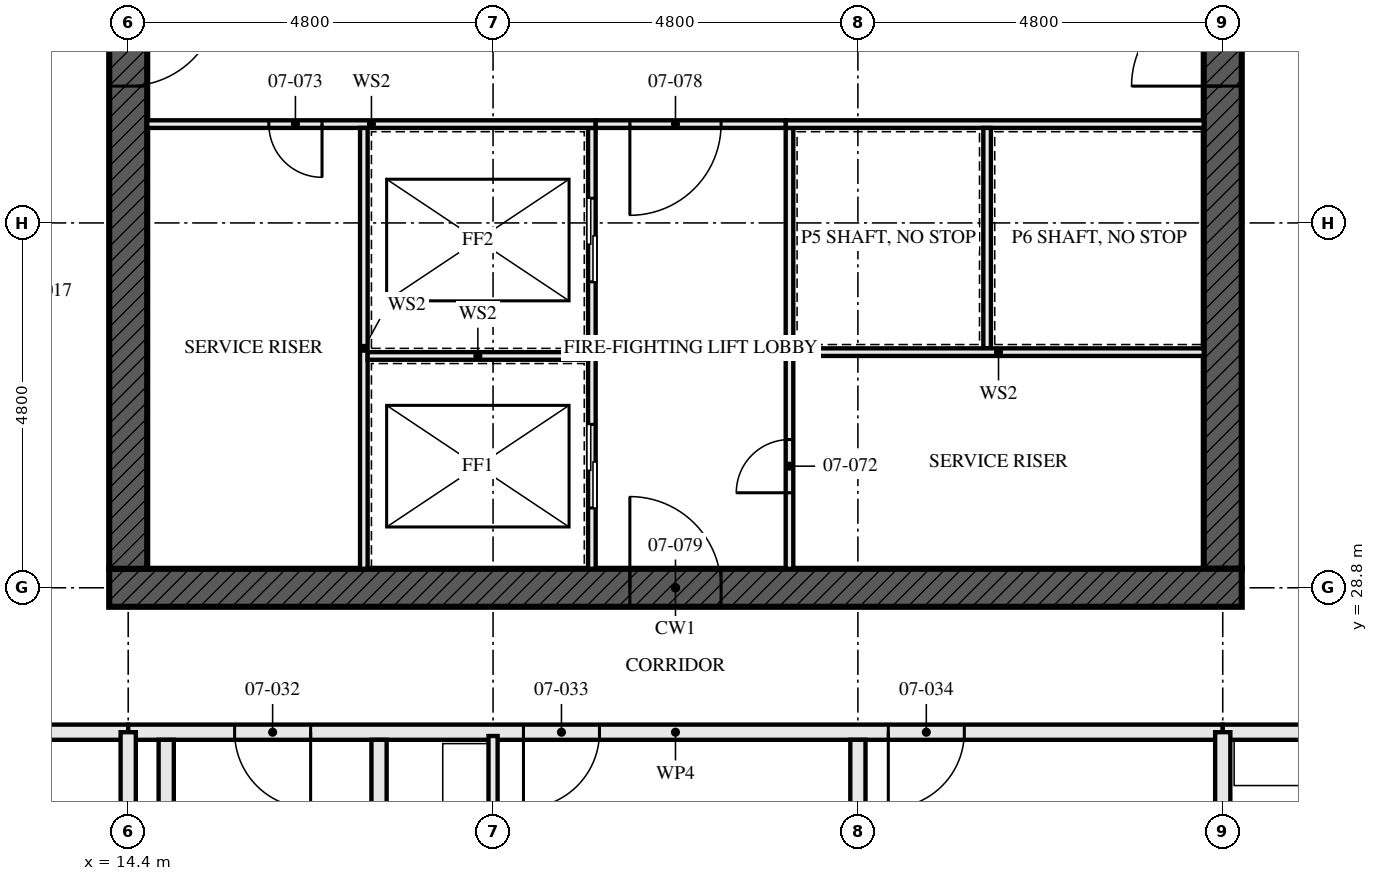
"""IFC4 building model, lengths in metres.
Left out: names, types, materials, properties, quantities, classifications, styles, units other than length and angle.
Written with IfcOpenShell. Run it as: python <this file> out.ifc"""

import sys

from ifc_helpers import new_model, si_unit, direction, frame, frame_2d, origin, place, context, subcontext, project, spatial, rectangle, extrude, element, fill, save


model = new_model("IFC4")
c1 = context("Model", 3, precision=1e-05, world=origin(), true_north=direction((0.0, 1.0)))
c2 = subcontext(c1, "Body", "Model", "MODEL_VIEW")
j1 = project(units=[si_unit("LENGTHUNIT", "METRE"), si_unit("PLANEANGLEUNIT", "RADIAN")], contexts=[c1])
p1 = place(None, origin())
s1 = spatial("IfcSite", under=j1, at=p1, CompositionType="ELEMENT")
p2 = place(p1, origin())
s2 = spatial("IfcBuilding", under=s1, at=p2, CompositionType="ELEMENT")
p3 = place(p2, frame((0.0, 0.0, 30.5)))
s3 = spatial("IfcBuildingStorey", under=s2, at=p3, CompositionType="ELEMENT", Elevation=30.5)
p4 = place(p3, frame((14.15, 28.8, -0.17), z_axis=(0.0, 0.0, 1.0), x_axis=(1.0, 0.0, 0.0)))
e1 = element("IfcWall", 1, at=p4, inside=s3, PredefinedType="SHEAR", context=c2, shape_type="SweptSolid", body=[
    extrude(rectangle(XDim=14.9, YDim=0.5, at=frame_2d((7.45, 0.0))), origin(), (0.0, 0.0, 1.0), 3.5),
])
p5 = place(p4, frame((6.85, 0.0, 0.17)))
e2 = element("IfcOpeningElement", 2, at=p5, cuts=e1, PredefinedType="OPENING", context=c2, shape_type="SweptSolid", body=[
    extrude(rectangle(XDim=1.2, YDim=2.1, at=frame_2d((0.6, 1.05))), frame((0.0, 0.26, 0.0), z_axis=(0.0, -1.0, 0.0), x_axis=(1.0, 0.0, 0.0)), (0.0, 0.0, 1.0), 0.521),
])
p6 = place(p3, frame((14.4, 42.95, -0.17), z_axis=(0.0, 0.0, 1.0), x_axis=(0.0, -1.0, 0.0)))
e3 = element("IfcWall", 3, at=p6, inside=s3, PredefinedType="SHEAR", context=c2, shape_type="SweptSolid", body=[
    extrude(rectangle(XDim=13.9, YDim=0.5, at=frame_2d((6.95, 0.0))), origin(), (0.0, 0.0, 1.0), 3.5),
])
p7 = place(p6, frame((6.35, 0.0, 0.17)))
e4 = element("IfcOpeningElement", 4, at=p7, cuts=e3, PredefinedType="OPENING", context=c2, shape_type="SweptSolid", body=[
    extrude(rectangle(XDim=1.2, YDim=2.1, at=frame_2d((0.6, 1.05))), frame((0.0, 0.26, 0.0), z_axis=(0.0, -1.0, 0.0), x_axis=(1.0, 0.0, 0.0)), (0.0, 0.0, 1.0), 0.521),
])
p8 = place(p3, frame((28.8, 29.05, -0.17), z_axis=(0.0, 0.0, 1.0), x_axis=(0.0, 1.0, 0.0)))
e5 = element("IfcWall", 5, at=p8, inside=s3, PredefinedType="SHEAR", context=c2, shape_type="SweptSolid", body=[
    extrude(rectangle(XDim=13.9, YDim=0.5, at=frame_2d((6.95, 0.0))), origin(), (0.0, 0.0, 1.0), 3.5),
])
p9 = place(p8, frame((6.35, 0.0, 0.17)))
e6 = element("IfcOpeningElement", 6, at=p9, cuts=e5, PredefinedType="OPENING", context=c2, shape_type="SweptSolid", body=[
    extrude(rectangle(XDim=1.2, YDim=2.1, at=frame_2d((0.6, 1.05))), frame((0.0, 0.26, 0.0), z_axis=(0.0, -1.0, 0.0), x_axis=(1.0, 0.0, 0.0)), (0.0, 0.0, 1.0), 0.521),
])
p10 = place(p3, frame((4.8, 26.9, 0.0), z_axis=(0.0, 0.0, 1.0), x_axis=(1.0, 0.0, 0.0)))
e7 = element("IfcWall", 7, at=p10, inside=s3, PredefinedType="PARTITIONING", context=c2, shape_type="SweptSolid", body=[
    extrude(rectangle(XDim=9.6, YDim=0.2, at=frame_2d((4.8, 0.0))), origin(), (0.0, 0.0, 1.0), 3.33),
])
p11 = place(p10, frame((0.4, 0.0, 0.0)))
e8 = element("IfcOpeningElement", 8, at=p11, cuts=e7, PredefinedType="OPENING", context=c2, shape_type="SweptSolid", body=[
    extrude(rectangle(XDim=1.0, YDim=2.1, at=frame_2d((0.5, 1.05))), frame((0.0, 0.111, 0.0), z_axis=(0.0, -1.0, 0.0), x_axis=(1.0, 0.0, 0.0)), (0.0, 0.0, 1.0), 0.221),
])
p12 = place(p10, frame((5.2, 0.0, 0.0)))
e9 = element("IfcOpeningElement", 9, at=p12, cuts=e7, PredefinedType="OPENING", context=c2, shape_type="SweptSolid", body=[
    extrude(rectangle(XDim=1.0, YDim=2.1, at=frame_2d((0.5, 1.05))), frame((0.0, 0.111, 0.0), z_axis=(0.0, -1.0, 0.0), x_axis=(1.0, 0.0, 0.0)), (0.0, 0.0, 1.0), 0.221),
])
for number, where, z_axis, x_axis in (
    (10, (14.9, 22.1, 0.0), (0.0, 0.0, 1.0), (0.0, 1.0, 0.0)),
    (11, (17.7, 22.1, 0.0), (0.0, 0.0, 1.0), (0.0, 1.0, 0.0)),
):
    element("IfcWall", number, at=place(p3, frame(where, z_axis=z_axis, x_axis=x_axis)), inside=s3, PredefinedType="SOLIDWALL", context=c2, shape_type="SweptSolid", body=[
        extrude(rectangle(XDim=4.7, YDim=0.2, at=frame_2d((2.35, 0.0))), origin(), (0.0, 0.0, 1.0), 2.99),
    ])
p13 = place(p3, frame((19.2, 20.6, 0.0), z_axis=(0.0, 0.0, 1.0), x_axis=(0.0, 1.0, 0.0)))
e12 = element("IfcWall", 12, at=p13, inside=s3, PredefinedType="PARTITIONING", context=c2, shape_type="SweptSolid", body=[
    extrude(rectangle(XDim=6.25, YDim=0.12, at=frame_2d((3.125, 0.0))), origin(), (0.0, 0.0, 1.0), 2.55),
])
p14 = place(p13, frame((2.675, 0.0, 0.0)))
e13 = element("IfcOpeningElement", 13, at=p14, cuts=e12, PredefinedType="OPENING", context=c2, shape_type="SweptSolid", body=[
    extrude(rectangle(XDim=0.9, YDim=2.1, at=frame_2d((0.45, 1.05))), frame((0.0, 0.071, 0.0), z_axis=(0.0, -1.0, 0.0), x_axis=(1.0, 0.0, 0.0)), (0.0, 0.0, 1.0), 0.141),
])
p15 = place(p3, frame((24.0, 14.795, 0.0), z_axis=(0.0, 0.0, 1.0), x_axis=(0.0, 1.0, 0.0)))
e14 = element("IfcWall", 14, at=p15, inside=s3, PredefinedType="PARTITIONING", context=c2, shape_type="SweptSolid", body=[
    extrude(rectangle(XDim=12.005, YDim=0.2, at=frame_2d((6.002, 0.0))), origin(), (0.0, 0.0, 1.0), 2.55),
])
p16 = place(p3, frame((14.4, 26.9, 0.0), z_axis=(0.0, 0.0, 1.0), x_axis=(1.0, 0.0, 0.0)))
e15 = element("IfcWall", 15, at=p16, inside=s3, PredefinedType="PARTITIONING", context=c2, shape_type="SweptSolid", body=[
    extrude(rectangle(XDim=14.4, YDim=0.2, at=frame_2d((7.2, 0.0))), origin(), (0.0, 0.0, 1.0), 2.55),
])
p17 = place(p16, frame((1.4, 0.0, 0.0)))
e16 = element("IfcOpeningElement", 16, at=p17, cuts=e15, PredefinedType="OPENING", context=c2, shape_type="SweptSolid", body=[
    extrude(rectangle(XDim=1.0, YDim=2.1, at=frame_2d((0.5, 1.05))), frame((0.0, 0.111, 0.0), z_axis=(0.0, -1.0, 0.0), x_axis=(1.0, 0.0, 0.0)), (0.0, 0.0, 1.0), 0.221),
])
p18 = place(p16, frame((5.2, 0.0, 0.0)))
e17 = element("IfcOpeningElement", 17, at=p18, cuts=e15, PredefinedType="OPENING", context=c2, shape_type="SweptSolid", body=[
    extrude(rectangle(XDim=1.0, YDim=2.1, at=frame_2d((0.5, 1.05))), frame((0.0, 0.111, 0.0), z_axis=(0.0, -1.0, 0.0), x_axis=(1.0, 0.0, 0.0)), (0.0, 0.0, 1.0), 0.221),
])
p19 = place(p16, frame((10.0, 0.0, 0.0)))
e18 = element("IfcOpeningElement", 18, at=p19, cuts=e15, PredefinedType="OPENING", context=c2, shape_type="SweptSolid", body=[
    extrude(rectangle(XDim=1.0, YDim=2.1, at=frame_2d((0.5, 1.05))), frame((0.0, 0.111, 0.0), z_axis=(0.0, -1.0, 0.0), x_axis=(1.0, 0.0, 0.0)), (0.0, 0.0, 1.0), 0.221),
])
p20 = place(p3, frame((28.8, 26.9, 0.0), z_axis=(0.0, 0.0, 1.0), x_axis=(1.0, 0.0, 0.0)))
e19 = element("IfcWall", 19, at=p20, inside=s3, PredefinedType="PARTITIONING", context=c2, shape_type="SweptSolid", body=[
    extrude(rectangle(XDim=9.6, YDim=0.2, at=frame_2d((4.8, 0.0))), origin(), (0.0, 0.0, 1.0), 3.33),
])
p21 = place(p20, frame((5.2, 0.0, 0.0)))
e20 = element("IfcOpeningElement", 20, at=p21, cuts=e19, PredefinedType="OPENING", context=c2, shape_type="SweptSolid", body=[
    extrude(rectangle(XDim=1.0, YDim=2.1, at=frame_2d((0.5, 1.05))), frame((0.0, 0.111, 0.0), z_axis=(0.0, -1.0, 0.0), x_axis=(1.0, 0.0, 0.0)), (0.0, 0.0, 1.0), 0.221),
])
p22 = place(p3, frame((20.5, 29.05, 0.0), z_axis=(0.0, 0.0, 1.0), x_axis=(0.0, 1.0, 0.0)))
e21 = element("IfcWall", 21, at=p22, inside=s3, PredefinedType="SOLIDWALL", context=c2, shape_type="SweptSolid", body=[
    extrude(rectangle(XDim=5.8, YDim=0.1, at=frame_2d((2.9, 0.0))), origin(), (0.0, 0.0, 1.0), 3.33),
])
p23 = place(p22, frame((0.8, 0.0, 0.0)))
e22 = element("IfcOpeningElement", 22, at=p23, cuts=e21, PredefinedType="OPENING", context=c2, shape_type="SweptSolid", body=[
    extrude(rectangle(XDim=1.1, YDim=2.3, at=frame_2d((0.55, 1.15))), frame((0.0, 0.061, 0.0), z_axis=(0.0, -1.0, 0.0), x_axis=(1.0, 0.0, 0.0)), (0.0, 0.0, 1.0), 0.121),
])
p24 = place(p22, frame((3.775, 0.0, 0.0)))
e23 = element("IfcOpeningElement", 23, at=p24, cuts=e21, PredefinedType="OPENING", context=c2, shape_type="SweptSolid", body=[
    extrude(rectangle(XDim=1.1, YDim=2.3, at=frame_2d((0.55, 1.15))), frame((0.0, 0.061, 0.0), z_axis=(0.0, -1.0, 0.0), x_axis=(1.0, 0.0, 0.0)), (0.0, 0.0, 1.0), 0.121),
])
p25 = place(p3, frame((23.1, 29.05, 0.0), z_axis=(0.0, 0.0, 1.0), x_axis=(0.0, 1.0, 0.0)))
e24 = element("IfcWall", 24, at=p25, inside=s3, PredefinedType="SOLIDWALL", context=c2, shape_type="SweptSolid", body=[
    extrude(rectangle(XDim=5.8, YDim=0.1, at=frame_2d((2.9, 0.0))), origin(), (0.0, 0.0, 1.0), 3.33),
])
p26 = place(p25, frame((1.0, 0.0, 0.0)))
e25 = element("IfcOpeningElement", 25, at=p26, cuts=e24, PredefinedType="OPENING", context=c2, shape_type="SweptSolid", body=[
    extrude(rectangle(XDim=0.7, YDim=2.1, at=frame_2d((0.35, 1.05))), frame((0.0, 0.061, 0.0), z_axis=(0.0, -1.0, 0.0), x_axis=(1.0, 0.0, 0.0)), (0.0, 0.0, 1.0), 0.121),
])
p27 = place(p3, frame((14.65, 34.9, 0.0), z_axis=(0.0, 0.0, 1.0), x_axis=(1.0, 0.0, 0.0)))
e26 = element("IfcWall", 26, at=p27, inside=s3, PredefinedType="SOLIDWALL", context=c2, shape_type="SweptSolid", body=[
    extrude(rectangle(XDim=5.9, YDim=0.1, at=frame_2d((2.95, 0.0))), origin(), (0.0, 0.0, 1.0), 3.33),
])
p28 = place(p27, frame((1.6, 0.0, 0.0)))
e27 = element("IfcOpeningElement", 27, at=p28, cuts=e26, PredefinedType="OPENING", context=c2, shape_type="SweptSolid", body=[
    extrude(rectangle(XDim=0.7, YDim=2.1, at=frame_2d((0.35, 1.05))), frame((0.0, 0.061, 0.0), z_axis=(0.0, -1.0, 0.0), x_axis=(1.0, 0.0, 0.0)), (0.0, 0.0, 1.0), 0.121),
])
p29 = place(p3, frame((23.05, 34.9, 0.0), z_axis=(0.0, 0.0, 1.0), x_axis=(1.0, 0.0, 0.0)))
e28 = element("IfcWall", 28, at=p29, inside=s3, PredefinedType="SOLIDWALL", context=c2, shape_type="SweptSolid", body=[
    extrude(rectangle(XDim=5.5, YDim=0.1, at=frame_2d((2.75, 0.0))), origin(), (0.0, 0.0, 1.0), 3.33),
])
p30 = place(p3, frame((20.55, 34.9, 0.0), z_axis=(0.0, 0.0, 1.0), x_axis=(1.0, 0.0, 0.0)))
e29 = element("IfcWall", 29, at=p30, inside=s3, PredefinedType="SOLIDWALL", context=c2, shape_type="SweptSolid", body=[
    extrude(rectangle(XDim=2.5, YDim=0.1, at=frame_2d((1.25, 0.0))), origin(), (0.0, 0.0, 1.0), 3.33),
])
p31 = place(p30, frame((0.45, 0.0, 0.0)))
e30 = element("IfcOpeningElement", 30, at=p31, cuts=e29, PredefinedType="OPENING", context=c2, shape_type="SweptSolid", body=[
    extrude(rectangle(XDim=1.2, YDim=2.1, at=frame_2d((0.6, 1.05))), frame((0.0, 0.061, 0.0), z_axis=(0.0, -1.0, 0.0), x_axis=(1.0, 0.0, 0.0)), (0.0, 0.0, 1.0), 0.121),
])
p32 = place(p3, frame((17.5, 29.05, 0.0), z_axis=(0.0, 0.0, 1.0), x_axis=(0.0, 1.0, 0.0)))
e31 = element("IfcWall", 31, at=p32, inside=s3, PredefinedType="SOLIDWALL", context=c2, shape_type="SweptSolid", body=[
    extrude(rectangle(XDim=5.8, YDim=0.1, at=frame_2d((2.9, 0.0))), origin(), (0.0, 0.0, 1.0), 3.33),
])
p33 = place(p3, frame((17.55, 31.85, 0.0), z_axis=(0.0, 0.0, 1.0), x_axis=(1.0, 0.0, 0.0)))
e32 = element("IfcWall", 32, at=p33, inside=s3, PredefinedType="SOLIDWALL", context=c2, shape_type="SweptSolid", body=[
    extrude(rectangle(XDim=2.9, YDim=0.1, at=frame_2d((1.45, 0.0))), origin(), (0.0, 0.0, 1.0), 3.33),
])
p34 = place(p3, frame((25.7, 31.95, 0.0), z_axis=(0.0, 0.0, 1.0), x_axis=(0.0, 1.0, 0.0)))
e33 = element("IfcWall", 33, at=p34, inside=s3, PredefinedType="SOLIDWALL", context=c2, shape_type="SweptSolid", body=[
    extrude(rectangle(XDim=2.9, YDim=0.1, at=frame_2d((1.45, 0.0))), origin(), (0.0, 0.0, 1.0), 3.33),
])
p35 = place(p3, frame((23.15, 31.9, 0.0), z_axis=(0.0, 0.0, 1.0), x_axis=(1.0, 0.0, 0.0)))
e34 = element("IfcWall", 34, at=p35, inside=s3, PredefinedType="SOLIDWALL", context=c2, shape_type="SweptSolid", body=[
    extrude(rectangle(XDim=5.4, YDim=0.1, at=frame_2d((2.7, 0.0))), origin(), (0.0, 0.0, 1.0), 3.33),
])
for number, where, z_axis, x_axis in (
    (35, (14.4, 24.395, 0.0), (0.0, 0.0, 1.0), (0.0, 1.0, 0.0)),
    (36, (28.8, 24.395, 0.0), (0.0, 0.0, 1.0), (0.0, 1.0, 0.0)),
):
    element("IfcWall", number, at=place(p3, frame(where, z_axis=z_axis, x_axis=x_axis)), inside=s3, PredefinedType="PARTITIONING", context=c2, shape_type="SweptSolid", body=[
        extrude(rectangle(XDim=2.505, YDim=0.2, at=frame_2d((1.252, 0.0))), origin(), (0.0, 0.0, 1.0), 2.32),
    ])
p36 = place(p17, frame((1.0, 0.0, 0.0), z_axis=(0.0, 0.0, 1.0), x_axis=(-1.0, 0.0, 0.0)))
e37 = element("IfcDoor", 37, at=p36, inside=s3, OperationType="SINGLE_SWING_RIGHT", PredefinedType="DOOR", context=c2, shape_type="SweptSolid", body=[
    extrude(rectangle(XDim=1.0, YDim=2.1, at=frame_2d((0.5, 1.05))), frame((0.0, 0.032, 0.0), z_axis=(0.0, -1.0, 0.0), x_axis=(1.0, 0.0, 0.0)), (0.0, 0.0, 1.0), 0.064),
])
fill(e16, e37)
p37 = place(p18, frame((1.0, 0.0, 0.0), z_axis=(0.0, 0.0, 1.0), x_axis=(-1.0, 0.0, 0.0)))
e38 = element("IfcDoor", 38, at=p37, inside=s3, OperationType="SINGLE_SWING_LEFT", PredefinedType="DOOR", context=c2, shape_type="SweptSolid", body=[
    extrude(rectangle(XDim=1.0, YDim=2.1, at=frame_2d((0.5, 1.05))), frame((0.0, 0.027, 0.0), z_axis=(0.0, -1.0, 0.0), x_axis=(1.0, 0.0, 0.0)), (0.0, 0.0, 1.0), 0.054),
])
fill(e17, e38)
p38 = place(p19, frame((1.0, 0.0, 0.0), z_axis=(0.0, 0.0, 1.0), x_axis=(-1.0, 0.0, 0.0)))
e39 = element("IfcDoor", 39, at=p38, inside=s3, OperationType="SINGLE_SWING_LEFT", PredefinedType="DOOR", context=c2, shape_type="SweptSolid", body=[
    extrude(rectangle(XDim=1.0, YDim=2.1, at=frame_2d((0.5, 1.05))), frame((0.0, 0.027, 0.0), z_axis=(0.0, -1.0, 0.0), x_axis=(1.0, 0.0, 0.0)), (0.0, 0.0, 1.0), 0.054),
])
fill(e18, e39)
p39 = place(p23, origin())
e40 = element("IfcDoor", 40, at=p39, inside=s3, OperationType="SLIDING_TO_LEFT", PredefinedType="DOOR", context=c2, shape_type="SweptSolid", body=[
    extrude(rectangle(XDim=1.1, YDim=2.3, at=frame_2d((0.55, 1.15))), frame((0.0, 0.05, 0.0), z_axis=(0.0, -1.0, 0.0), x_axis=(1.0, 0.0, 0.0)), (0.0, 0.0, 1.0), 0.1),
])
fill(e22, e40)
p40 = place(p24, origin())
e41 = element("IfcDoor", 41, at=p40, inside=s3, OperationType="SLIDING_TO_LEFT", PredefinedType="DOOR", context=c2, shape_type="SweptSolid", body=[
    extrude(rectangle(XDim=1.1, YDim=2.3, at=frame_2d((0.55, 1.15))), frame((0.0, 0.05, 0.0), z_axis=(0.0, -1.0, 0.0), x_axis=(1.0, 0.0, 0.0)), (0.0, 0.0, 1.0), 0.1),
])
fill(e23, e41)
p41 = place(p26, origin())
e42 = element("IfcDoor", 42, at=p41, inside=s3, OperationType="SINGLE_SWING_RIGHT", PredefinedType="DOOR", context=c2, shape_type="SweptSolid", body=[
    extrude(rectangle(XDim=0.7, YDim=2.1, at=frame_2d((0.35, 1.05))), frame((0.0, 0.027, 0.0), z_axis=(0.0, -1.0, 0.0), x_axis=(1.0, 0.0, 0.0)), (0.0, 0.0, 1.0), 0.054),
])
fill(e25, e42)
p42 = place(p28, frame((0.7, 0.0, 0.0), z_axis=(0.0, 0.0, 1.0), x_axis=(-1.0, 0.0, 0.0)))
e43 = element("IfcDoor", 43, at=p42, inside=s3, OperationType="SINGLE_SWING_RIGHT", PredefinedType="DOOR", context=c2, shape_type="SweptSolid", body=[
    extrude(rectangle(XDim=0.7, YDim=2.1, at=frame_2d((0.35, 1.05))), frame((0.0, 0.027, 0.0), z_axis=(0.0, -1.0, 0.0), x_axis=(1.0, 0.0, 0.0)), (0.0, 0.0, 1.0), 0.054),
])
fill(e27, e43)
p43 = place(p31, frame((1.2, 0.0, 0.0), z_axis=(0.0, 0.0, 1.0), x_axis=(-1.0, 0.0, 0.0)))
e44 = element("IfcDoor", 44, at=p43, inside=s3, OperationType="SINGLE_SWING_LEFT", PredefinedType="DOOR", context=c2, shape_type="SweptSolid", body=[
    extrude(rectangle(XDim=1.2, YDim=2.1, at=frame_2d((0.6, 1.05))), frame((0.0, 0.027, 0.0), z_axis=(0.0, -1.0, 0.0), x_axis=(1.0, 0.0, 0.0)), (0.0, 0.0, 1.0), 0.054),
])
fill(e30, e44)
p44 = place(p5, origin())
e45 = element("IfcDoor", 45, at=p44, inside=s3, OperationType="SINGLE_SWING_LEFT", PredefinedType="DOOR", context=c2, shape_type="SweptSolid", body=[
    extrude(rectangle(XDim=1.2, YDim=2.1, at=frame_2d((0.6, 1.05))), frame((0.0, 0.027, 0.0), z_axis=(0.0, -1.0, 0.0), x_axis=(1.0, 0.0, 0.0)), (0.0, 0.0, 1.0), 0.054),
])
fill(e2, e45)
p45 = place(p7, origin())
e46 = element("IfcDoor", 46, at=p45, inside=s3, OperationType="SINGLE_SWING_LEFT", PredefinedType="DOOR", context=c2, shape_type="SweptSolid", body=[
    extrude(rectangle(XDim=1.2, YDim=2.1, at=frame_2d((0.6, 1.05))), frame((0.0, 0.027, 0.0), z_axis=(0.0, -1.0, 0.0), x_axis=(1.0, 0.0, 0.0)), (0.0, 0.0, 1.0), 0.054),
])
fill(e4, e46)
p46 = place(p9, origin())
e47 = element("IfcDoor", 47, at=p46, inside=s3, OperationType="SINGLE_SWING_LEFT", PredefinedType="DOOR", context=c2, shape_type="SweptSolid", body=[
    extrude(rectangle(XDim=1.2, YDim=2.1, at=frame_2d((0.6, 1.05))), frame((0.0, 0.027, 0.0), z_axis=(0.0, -1.0, 0.0), x_axis=(1.0, 0.0, 0.0)), (0.0, 0.0, 1.0), 0.054),
])
fill(e6, e47)
save(model, sys.argv[1])
